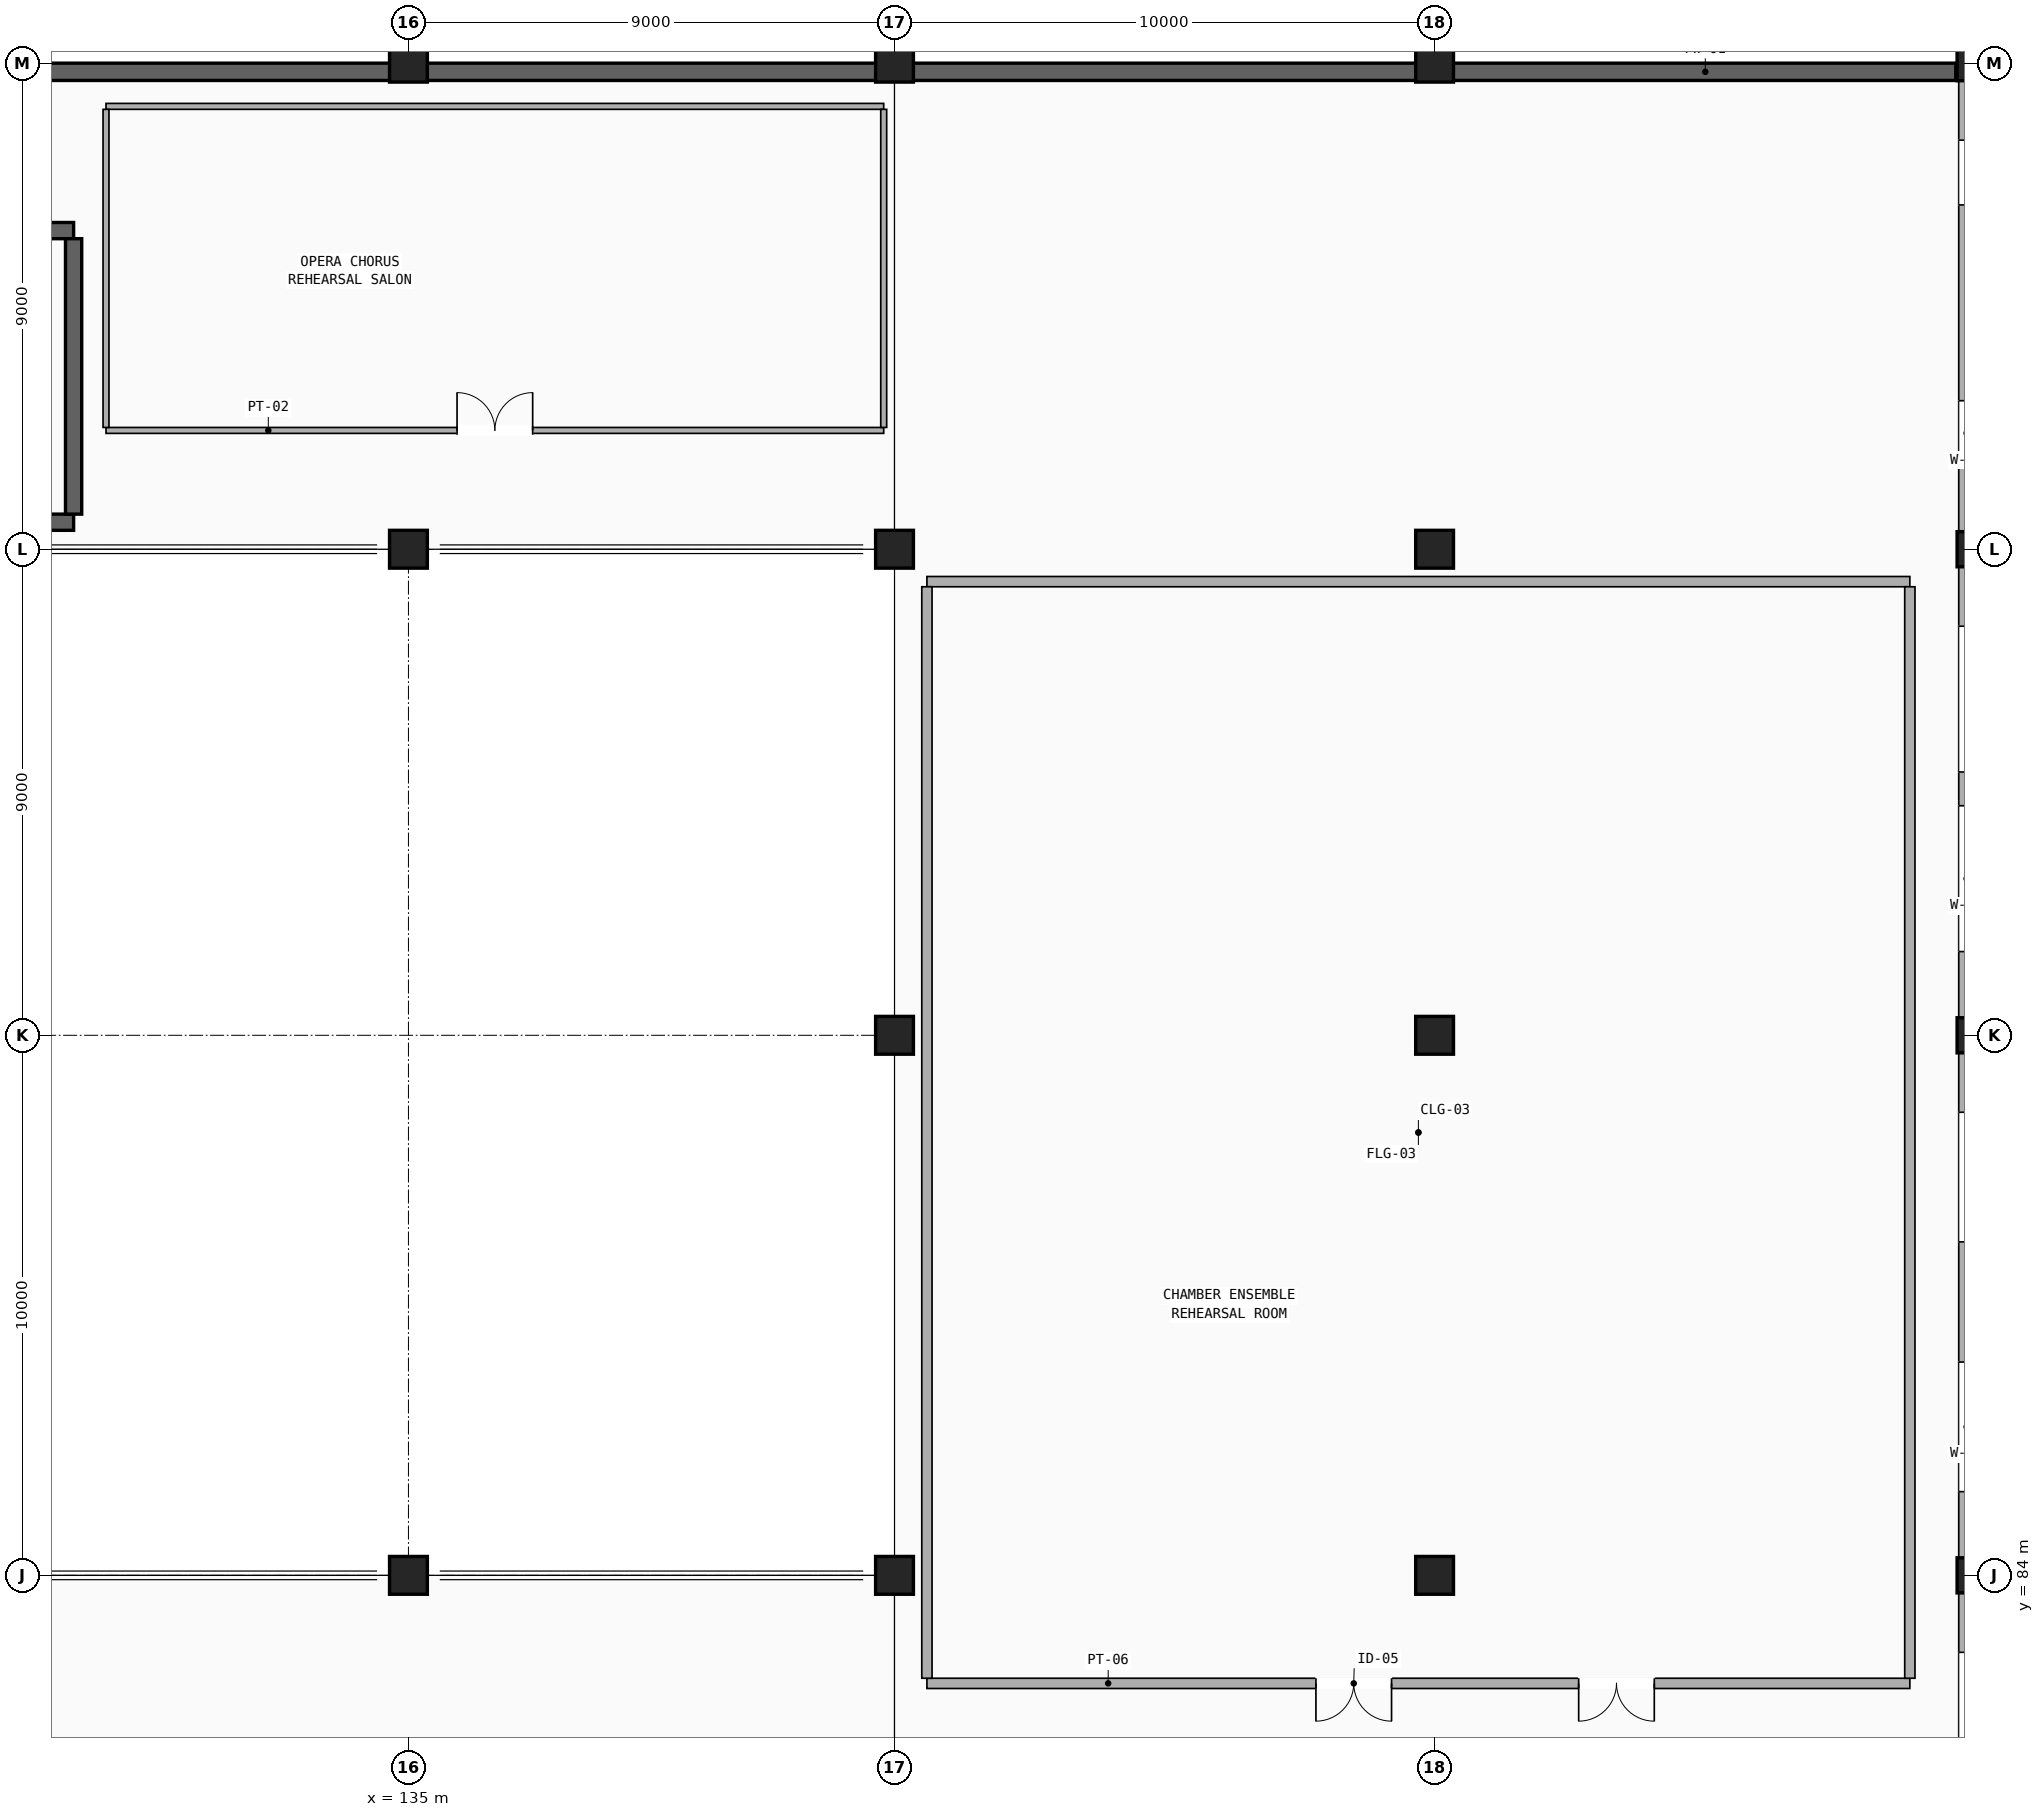
"""IFC4 building model, lengths in metres.
Left out: names, types, materials, properties, quantities, classifications, styles, units other than length and angle.
Written with IfcOpenShell. Run it as: python <this file> out.ifc"""

import sys

from ifc_helpers import new_model, si_unit, direction, frame, frame_2d, origin, origin_2d, place, context, subcontext, project, spatial, rectangle, extrude, element, fill, save


model = new_model("IFC4")
c1 = context("Model", 3, precision=1e-05, world=origin(), true_north=direction((0.0, 1.0)))
c2 = subcontext(c1, "Body", "Model", "MODEL_VIEW")
j1 = project(units=[si_unit("LENGTHUNIT", "METRE"), si_unit("PLANEANGLEUNIT", "RADIAN")], contexts=[c1])
p1 = place(None, origin())
s1 = spatial("IfcSite", under=j1, at=p1, CompositionType="ELEMENT")
p2 = place(p1, origin())
s2 = spatial("IfcBuilding", under=s1, at=p2, CompositionType="ELEMENT")
p3 = place(p2, frame((0.0, 0.0, 5.1)))
s3 = spatial("IfcBuildingStorey", under=s2, at=p3, CompositionType="ELEMENT", Elevation=5.1)
for number, where, z_axis, x_axis in (
    (1, (135.0, 84.0, 0.0), (0.0, 0.0, 1.0), (1.0, 0.0, 0.0)),
    (2, (135.0, 103.0, 0.0), (0.0, 0.0, 1.0), (1.0, 0.0, 0.0)),
    (3, (135.0, 112.0, 0.0), (0.0, 0.0, 1.0), (1.0, 0.0, 0.0)),
    (4, (144.0, 84.0, 0.0), (0.0, 0.0, 1.0), (1.0, 0.0, 0.0)),
    (5, (144.0, 94.0, 0.0), (0.0, 0.0, 1.0), (1.0, 0.0, 0.0)),
    (6, (144.0, 103.0, 0.0), (0.0, 0.0, 1.0), (1.0, 0.0, 0.0)),
    (7, (144.0, 112.0, 0.0), (0.0, 0.0, 1.0), (1.0, 0.0, 0.0)),
    (8, (154.0, 84.0, 0.0), (0.0, 0.0, 1.0), (1.0, 0.0, 0.0)),
    (9, (154.0, 94.0, 0.0), (0.0, 0.0, 1.0), (1.0, 0.0, 0.0)),
    (10, (154.0, 103.0, 0.0), (0.0, 0.0, 1.0), (1.0, 0.0, 0.0)),
    (11, (154.0, 112.0, 0.0), (0.0, 0.0, 1.0), (1.0, 0.0, 0.0)),
):
    element("IfcColumn", number, at=place(p3, frame(where, z_axis=z_axis, x_axis=x_axis)), inside=s3, PredefinedType="COLUMN", context=c2, shape_type="SweptSolid", body=[
        extrude(rectangle(XDim=0.7, YDim=0.7, at=origin_2d()), origin(), (0.0, 0.0, 1.0), 4.42),
    ])
for number, where, z_axis, x_axis in (
    (12, (164.0, 84.0, 0.0), (0.0, 0.0, 1.0), (1.0, 0.0, 0.0)),
    (13, (164.0, 94.0, 0.0), (0.0, 0.0, 1.0), (1.0, 0.0, 0.0)),
    (14, (164.0, 103.0, 0.0), (0.0, 0.0, 1.0), (1.0, 0.0, 0.0)),
    (15, (164.0, 112.0, 0.0), (0.0, 0.0, 1.0), (1.0, 0.0, 0.0)),
):
    element("IfcColumn", number, at=place(p3, frame(where, z_axis=z_axis, x_axis=x_axis)), inside=s3, PredefinedType="COLUMN", context=c2, shape_type="SweptSolid", body=[
        extrude(rectangle(XDim=0.65, YDim=0.65, at=origin_2d()), origin(), (0.0, 0.0, 1.0), 4.42),
    ])
p4 = place(p3, frame((118.5, 103.5, 0.0), z_axis=(0.0, 0.0, 1.0), x_axis=(1.0, 0.0, 0.0)))
e16 = element("IfcWall", 16, at=p4, inside=s3, PredefinedType="SHEAR", context=c2, shape_type="SweptSolid", body=[
    extrude(rectangle(XDim=10.3, YDim=0.3, at=frame_2d((5.15, 0.0))), origin(), (0.0, 0.0, 1.0), 4.42),
])
p5 = place(p3, frame((118.5, 108.9, 0.0), z_axis=(0.0, 0.0, 1.0), x_axis=(1.0, 0.0, 0.0)))
e17 = element("IfcWall", 17, at=p5, inside=s3, PredefinedType="SHEAR", context=c2, shape_type="SweptSolid", body=[
    extrude(rectangle(XDim=10.3, YDim=0.3, at=frame_2d((5.15, 0.0))), origin(), (0.0, 0.0, 1.0), 4.42),
])
p6 = place(p5, frame((0.45, 0.0, 0.0)))
e18 = element("IfcOpeningElement", 18, at=p6, cuts=e17, PredefinedType="OPENING", context=c2, shape_type="SweptSolid", body=[
    extrude(rectangle(XDim=1.1, YDim=2.2, at=frame_2d((0.55, 1.1))), frame((0.0, 0.16, 0.0), z_axis=(0.0, -1.0, 0.0), x_axis=(1.0, 0.0, 0.0)), (0.0, 0.0, 1.0), 0.32),
])
p7 = place(p3, frame((128.8, 103.65, 0.0), z_axis=(0.0, 0.0, 1.0), x_axis=(0.0, 1.0, 0.0)))
e19 = element("IfcWall", 19, at=p7, inside=s3, PredefinedType="SHEAR", context=c2, shape_type="SweptSolid", body=[
    extrude(rectangle(XDim=5.1, YDim=0.3, at=frame_2d((2.55, 0.0))), origin(), (0.0, 0.0, 1.0), 4.42),
])
p8 = place(p3, frame((73.775, 111.84, 0.0), z_axis=(0.0, 0.0, 1.0), x_axis=(1.0, 0.0, 0.0)))
e20 = element("IfcWall", 20, at=p8, inside=s3, PredefinedType="SHEAR", context=c2, shape_type="SweptSolid", body=[
    extrude(rectangle(XDim=89.875, YDim=0.32, at=frame_2d((44.938, 0.0))), origin(), (0.0, 0.0, 1.0), 4.42),
])
p9 = place(p3, frame((163.85, 75.325, 0.0), z_axis=(0.0, 0.0, 1.0), x_axis=(0.0, 1.0, 0.0)))
e21 = element("IfcWall", 21, at=p9, inside=s3, PredefinedType="STANDARD", context=c2, shape_type="SweptSolid", body=[
    extrude(rectangle(XDim=8.35, YDim=0.29, at=frame_2d((4.175, 0.0))), origin(), (0.0, 0.0, 1.0), 3.39),
])
p10 = place(p9, frame((1.225, 0.0, 0.9)))
e22 = element("IfcOpeningElement", 22, at=p10, cuts=e21, PredefinedType="OPENING", context=c2, shape_type="SweptSolid", body=[
    extrude(rectangle(XDim=2.1, YDim=2.1, at=frame_2d((1.05, 1.05))), frame((0.0, 0.155, 0.0), z_axis=(0.0, -1.0, 0.0), x_axis=(1.0, 0.0, 0.0)), (0.0, 0.0, 1.0), 0.31),
])
p11 = place(p9, frame((5.15, 0.0, 0.9)))
e23 = element("IfcOpeningElement", 23, at=p11, cuts=e21, PredefinedType="OPENING", context=c2, shape_type="SweptSolid", body=[
    extrude(rectangle(XDim=2.1, YDim=2.1, at=frame_2d((1.05, 1.05))), frame((0.0, 0.155, 0.0), z_axis=(0.0, -1.0, 0.0), x_axis=(1.0, 0.0, 0.0)), (0.0, 0.0, 1.0), 0.31),
])
p12 = place(p3, frame((163.85, 84.325, 0.0), z_axis=(0.0, 0.0, 1.0), x_axis=(0.0, 1.0, 0.0)))
e24 = element("IfcWall", 24, at=p12, inside=s3, PredefinedType="STANDARD", context=c2, shape_type="SweptSolid", body=[
    extrude(rectangle(XDim=9.35, YDim=0.29, at=frame_2d((4.675, 0.0))), origin(), (0.0, 0.0, 1.0), 3.39),
])
p13 = place(p12, frame((1.225, 0.0, 0.9)))
e25 = element("IfcOpeningElement", 25, at=p13, cuts=e24, PredefinedType="OPENING", context=c2, shape_type="SweptSolid", body=[
    extrude(rectangle(XDim=2.4, YDim=2.2, at=frame_2d((1.2, 1.1))), frame((0.0, 0.155, 0.0), z_axis=(0.0, -1.0, 0.0), x_axis=(1.0, 0.0, 0.0)), (0.0, 0.0, 1.0), 0.31),
])
p14 = place(p12, frame((5.85, 0.0, 0.9)))
e26 = element("IfcOpeningElement", 26, at=p14, cuts=e24, PredefinedType="OPENING", context=c2, shape_type="SweptSolid", body=[
    extrude(rectangle(XDim=2.4, YDim=2.2, at=frame_2d((1.2, 1.1))), frame((0.0, 0.155, 0.0), z_axis=(0.0, -1.0, 0.0), x_axis=(1.0, 0.0, 0.0)), (0.0, 0.0, 1.0), 0.31),
])
p15 = place(p3, frame((163.85, 94.325, 0.0), z_axis=(0.0, 0.0, 1.0), x_axis=(0.0, 1.0, 0.0)))
e27 = element("IfcWall", 27, at=p15, inside=s3, PredefinedType="STANDARD", context=c2, shape_type="SweptSolid", body=[
    extrude(rectangle(XDim=8.35, YDim=0.29, at=frame_2d((4.175, 0.0))), origin(), (0.0, 0.0, 1.0), 3.39),
])
p16 = place(p15, frame((1.225, 0.0, 0.9)))
e28 = element("IfcOpeningElement", 28, at=p16, cuts=e27, PredefinedType="OPENING", context=c2, shape_type="SweptSolid", body=[
    extrude(rectangle(XDim=2.7, YDim=2.2, at=frame_2d((1.35, 1.1))), frame((0.0, 0.155, 0.0), z_axis=(0.0, -1.0, 0.0), x_axis=(1.0, 0.0, 0.0)), (0.0, 0.0, 1.0), 0.31),
])
p17 = place(p15, frame((4.55, 0.0, 0.9)))
e29 = element("IfcOpeningElement", 29, at=p17, cuts=e27, PredefinedType="OPENING", context=c2, shape_type="SweptSolid", body=[
    extrude(rectangle(XDim=2.7, YDim=2.2, at=frame_2d((1.35, 1.1))), frame((0.0, 0.155, 0.0), z_axis=(0.0, -1.0, 0.0), x_axis=(1.0, 0.0, 0.0)), (0.0, 0.0, 1.0), 0.31),
])
p18 = place(p3, frame((163.85, 103.325, 0.0), z_axis=(0.0, 0.0, 1.0), x_axis=(0.0, 1.0, 0.0)))
e30 = element("IfcWall", 30, at=p18, inside=s3, PredefinedType="STANDARD", context=c2, shape_type="SweptSolid", body=[
    extrude(rectangle(XDim=8.35, YDim=0.29, at=frame_2d((4.175, 0.0))), origin(), (0.0, 0.0, 1.0), 3.39),
])
p19 = place(p18, frame((1.225, 0.0, 0.9)))
e31 = element("IfcOpeningElement", 31, at=p19, cuts=e30, PredefinedType="OPENING", context=c2, shape_type="SweptSolid", body=[
    extrude(rectangle(XDim=1.2, YDim=1.6, at=frame_2d((0.6, 0.8))), frame((0.0, 0.155, 0.0), z_axis=(0.0, -1.0, 0.0), x_axis=(1.0, 0.0, 0.0)), (0.0, 0.0, 1.0), 0.31),
])
p20 = place(p18, frame((6.05, 0.0, 0.9)))
e32 = element("IfcOpeningElement", 32, at=p20, cuts=e30, PredefinedType="OPENING", context=c2, shape_type="SweptSolid", body=[
    extrude(rectangle(XDim=1.2, YDim=1.6, at=frame_2d((0.6, 0.8))), frame((0.0, 0.155, 0.0), z_axis=(0.0, -1.0, 0.0), x_axis=(1.0, 0.0, 0.0)), (0.0, 0.0, 1.0), 0.31),
])
p21 = place(p3, frame((144.6, 82.0, 0.0), z_axis=(0.0, 0.0, 1.0), x_axis=(1.0, 0.0, 0.0)))
e33 = element("IfcWall", 33, at=p21, inside=s3, PredefinedType="PARTITIONING", context=c2, shape_type="SweptSolid", body=[
    extrude(rectangle(XDim=18.2, YDim=0.19, at=frame_2d((9.1, 0.0))), origin(), (0.0, 0.0, 1.0), 3.29),
])
p22 = place(p21, frame((7.203, 0.0, 0.0)))
e34 = element("IfcOpeningElement", 34, at=p22, cuts=e33, PredefinedType="OPENING", context=c2, shape_type="SweptSolid", body=[
    extrude(rectangle(XDim=1.4, YDim=2.2, at=frame_2d((0.7, 1.1))), frame((0.0, 0.105, 0.0), z_axis=(0.0, -1.0, 0.0), x_axis=(1.0, 0.0, 0.0)), (0.0, 0.0, 1.0), 0.21),
])
p23 = place(p21, frame((12.068, 0.0, 0.0)))
e35 = element("IfcOpeningElement", 35, at=p23, cuts=e33, PredefinedType="OPENING", context=c2, shape_type="SweptSolid", body=[
    extrude(rectangle(XDim=1.4, YDim=2.2, at=frame_2d((0.7, 1.1))), frame((0.0, 0.105, 0.0), z_axis=(0.0, -1.0, 0.0), x_axis=(1.0, 0.0, 0.0)), (0.0, 0.0, 1.0), 0.21),
])
p24 = place(p3, frame((144.6, 102.4, 0.0), z_axis=(0.0, 0.0, 1.0), x_axis=(1.0, 0.0, 0.0)))
e36 = element("IfcWall", 36, at=p24, inside=s3, PredefinedType="PARTITIONING", context=c2, shape_type="SweptSolid", body=[
    extrude(rectangle(XDim=18.2, YDim=0.19, at=frame_2d((9.1, 0.0))), origin(), (0.0, 0.0, 1.0), 3.46),
])
for number, where, z_axis, x_axis in (
    (37, (144.6, 82.095, 0.0), (0.0, 0.0, 1.0), (0.0, 1.0, 0.0)),
    (38, (162.8, 82.095, 0.0), (0.0, 0.0, 1.0), (0.0, 1.0, 0.0)),
):
    element("IfcWall", number, at=place(p3, frame(where, z_axis=z_axis, x_axis=x_axis)), inside=s3, PredefinedType="PARTITIONING", context=c2, shape_type="SweptSolid", body=[
        extrude(rectangle(XDim=20.21, YDim=0.19, at=frame_2d((10.105, 0.0))), origin(), (0.0, 0.0, 1.0), 3.24),
    ])
p25 = place(p3, frame((129.4, 105.2, 0.0), z_axis=(0.0, 0.0, 1.0), x_axis=(1.0, 0.0, 0.0)))
e39 = element("IfcWall", 39, at=p25, inside=s3, PredefinedType="PARTITIONING", context=c2, shape_type="SweptSolid", body=[
    extrude(rectangle(XDim=14.4, YDim=0.11, at=frame_2d((7.2, 0.0))), origin(), (0.0, 0.0, 1.0), 3.49),
])
p26 = place(p25, frame((6.5, 0.0, 0.0)))
e40 = element("IfcOpeningElement", 40, at=p26, cuts=e39, PredefinedType="OPENING", context=c2, shape_type="SweptSolid", body=[
    extrude(rectangle(XDim=1.4, YDim=2.2, at=frame_2d((0.7, 1.1))), frame((0.0, 0.065, 0.0), z_axis=(0.0, -1.0, 0.0), x_axis=(1.0, 0.0, 0.0)), (0.0, 0.0, 1.0), 0.13),
])
p27 = place(p3, frame((129.4, 111.2, 0.0), z_axis=(0.0, 0.0, 1.0), x_axis=(1.0, 0.0, 0.0)))
e41 = element("IfcWall", 41, at=p27, inside=s3, PredefinedType="PARTITIONING", context=c2, shape_type="SweptSolid", body=[
    extrude(rectangle(XDim=14.4, YDim=0.11, at=frame_2d((7.2, 0.0))), origin(), (0.0, 0.0, 1.0), 3.49),
])
p28 = place(p3, frame((129.4, 105.255, 0.0), z_axis=(0.0, 0.0, 1.0), x_axis=(0.0, 1.0, 0.0)))
e42 = element("IfcWall", 42, at=p28, inside=s3, PredefinedType="PARTITIONING", context=c2, shape_type="SweptSolid", body=[
    extrude(rectangle(XDim=5.89, YDim=0.11, at=frame_2d((2.945, 0.0))), origin(), (0.0, 0.0, 1.0), 4.16),
])
p29 = place(p3, frame((143.8, 105.255, 0.0), z_axis=(0.0, 0.0, 1.0), x_axis=(0.0, 1.0, 0.0)))
e43 = element("IfcWall", 43, at=p29, inside=s3, PredefinedType="PARTITIONING", context=c2, shape_type="SweptSolid", body=[
    extrude(rectangle(XDim=5.89, YDim=0.11, at=frame_2d((2.945, 0.0))), origin(), (0.0, 0.0, 1.0), 3.49),
])
p30 = place(p22, frame((1.4, 0.0, 0.0), z_axis=(0.0, 0.0, 1.0), x_axis=(-1.0, 0.0, 0.0)))
e44 = element("IfcDoor", 44, at=p30, inside=s3, OperationType="DOUBLE_DOOR_SINGLE_SWING", PredefinedType="DOOR", context=c2, shape_type="SweptSolid", body=[
    extrude(rectangle(XDim=1.4, YDim=2.2, at=frame_2d((0.7, 1.1))), frame((0.0, 0.025, 0.0), z_axis=(0.0, -1.0, 0.0), x_axis=(1.0, 0.0, 0.0)), (0.0, 0.0, 1.0), 0.05),
])
fill(e34, e44)
p31 = place(p23, frame((1.4, 0.0, 0.0), z_axis=(0.0, 0.0, 1.0), x_axis=(-1.0, 0.0, 0.0)))
e45 = element("IfcDoor", 45, at=p31, inside=s3, OperationType="DOUBLE_DOOR_SINGLE_SWING", PredefinedType="DOOR", context=c2, shape_type="SweptSolid", body=[
    extrude(rectangle(XDim=1.4, YDim=2.2, at=frame_2d((0.7, 1.1))), frame((0.0, 0.025, 0.0), z_axis=(0.0, -1.0, 0.0), x_axis=(1.0, 0.0, 0.0)), (0.0, 0.0, 1.0), 0.05),
])
fill(e35, e45)
p32 = place(p26, origin())
e46 = element("IfcDoor", 46, at=p32, inside=s3, OperationType="DOUBLE_DOOR_SINGLE_SWING", PredefinedType="DOOR", context=c2, shape_type="SweptSolid", body=[
    extrude(rectangle(XDim=1.4, YDim=2.2, at=frame_2d((0.7, 1.1))), frame((0.0, 0.025, 0.0), z_axis=(0.0, -1.0, 0.0), x_axis=(1.0, 0.0, 0.0)), (0.0, 0.0, 1.0), 0.05),
])
fill(e40, e46)
save(model, sys.argv[1])
